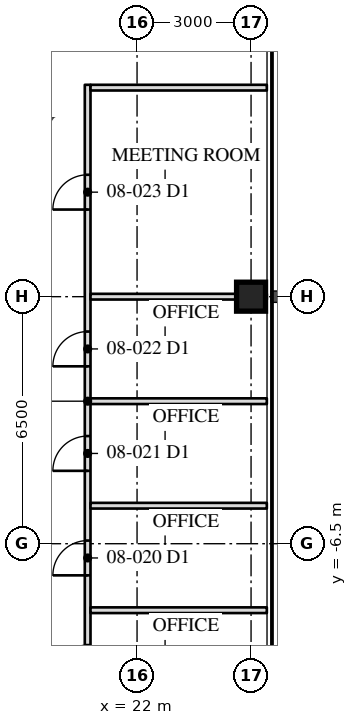
"""IFC4 building model, lengths in metres.
Left out: names, types, materials, properties, quantities, classifications, styles, units other than length and angle.
Written with IfcOpenShell. Run it as: python <this file> out.ifc"""

import sys

from ifc_helpers import new_model, si_unit, direction, frame, frame_2d, origin, origin_2d, place, context, subcontext, project, spatial, rectangle, hollow_rectangle, extrude, element, fill, save


model = new_model("IFC4")
c1 = context("Model", 3, precision=1e-05, world=origin(), true_north=direction((0.0, 1.0)))
c2 = subcontext(c1, "Body", "Model", "MODEL_VIEW")
j1 = project(units=[si_unit("LENGTHUNIT", "METRE"), si_unit("PLANEANGLEUNIT", "RADIAN")], contexts=[c1])
p1 = place(None, origin())
s1 = spatial("IfcSite", under=j1, at=p1, CompositionType="ELEMENT")
p2 = place(p1, origin())
s2 = spatial("IfcBuilding", under=s1, at=p2, CompositionType="ELEMENT")
p3 = place(p2, frame((0.0, 0.0, 36.5)))
s3 = spatial("IfcBuildingStorey", under=s2, at=p3, CompositionType="ELEMENT", Elevation=36.5)
p4 = place(p3, frame((25.0, 0.0, 0.0), z_axis=(0.0, 0.0, 1.0), x_axis=(0.0, 1.0, 0.0)))
e1 = element("IfcColumn", 1, at=p4, inside=s3, PredefinedType="COLUMN", context=c2, shape_type="SweptSolid", body=[
    extrude(hollow_rectangle(XDim=0.762, YDim=0.762, WallThickness=0.127, at=origin_2d()), origin(), (0.0, 0.0, 1.0), 4.1),
])
p5 = place(p3, frame((20.7, -11.075, 0.0), z_axis=(0.0, 0.0, 1.0), x_axis=(0.0, 1.0, 0.0)))
e2 = element("IfcWall", 2, at=p5, inside=s3, PredefinedType="PARTITIONING", context=c2, shape_type="SweptSolid", body=[
    extrude(rectangle(XDim=16.65, YDim=0.15, at=frame_2d((8.325, 0.0))), origin(), (0.0, 0.0, 1.0), 3.91),
])
p6 = place(p5, frame((0.992, 0.0, 0.0)))
e3 = element("IfcOpeningElement", 3, at=p6, cuts=e2, PredefinedType="OPENING", context=c2, shape_type="SweptSolid", body=[
    extrude(rectangle(XDim=0.915, YDim=2.134, at=frame_2d((0.458, 1.067))), frame((0.0, 0.085, 0.0), z_axis=(0.0, -1.0, 0.0), x_axis=(1.0, 0.0, 0.0)), (0.0, 0.0, 1.0), 0.17),
])
p7 = place(p5, frame((3.742, 0.0, 0.0)))
e4 = element("IfcOpeningElement", 4, at=p7, cuts=e2, PredefinedType="OPENING", context=c2, shape_type="SweptSolid", body=[
    extrude(rectangle(XDim=0.915, YDim=2.134, at=frame_2d((0.458, 1.067))), frame((0.0, 0.085, 0.0), z_axis=(0.0, -1.0, 0.0), x_axis=(1.0, 0.0, 0.0)), (0.0, 0.0, 1.0), 0.17),
])
p8 = place(p5, frame((6.492, 0.0, 0.0)))
e5 = element("IfcOpeningElement", 5, at=p8, cuts=e2, PredefinedType="OPENING", context=c2, shape_type="SweptSolid", body=[
    extrude(rectangle(XDim=0.915, YDim=2.134, at=frame_2d((0.458, 1.067))), frame((0.0, 0.085, 0.0), z_axis=(0.0, -1.0, 0.0), x_axis=(1.0, 0.0, 0.0)), (0.0, 0.0, 1.0), 0.17),
])
p9 = place(p5, frame((9.242, 0.0, 0.0)))
e6 = element("IfcOpeningElement", 6, at=p9, cuts=e2, PredefinedType="OPENING", context=c2, shape_type="SweptSolid", body=[
    extrude(rectangle(XDim=0.915, YDim=2.134, at=frame_2d((0.458, 1.067))), frame((0.0, 0.085, 0.0), z_axis=(0.0, -1.0, 0.0), x_axis=(1.0, 0.0, 0.0)), (0.0, 0.0, 1.0), 0.17),
])
p10 = place(p5, frame((13.367, 0.0, 0.0)))
e7 = element("IfcOpeningElement", 7, at=p10, cuts=e2, PredefinedType="OPENING", context=c2, shape_type="SweptSolid", body=[
    extrude(rectangle(XDim=0.915, YDim=2.134, at=frame_2d((0.458, 1.067))), frame((0.0, 0.085, 0.0), z_axis=(0.0, -1.0, 0.0), x_axis=(1.0, 0.0, 0.0)), (0.0, 0.0, 1.0), 0.17),
])
for number, where, z_axis, x_axis in (
    (8, (20.775, -8.25, 0.0), (0.0, 0.0, 1.0), (1.0, 0.0, 0.0)),
    (9, (20.775, -5.5, 0.0), (0.0, 0.0, 1.0), (1.0, 0.0, 0.0)),
    (10, (20.775, -2.75, 0.0), (0.0, 0.0, 1.0), (1.0, 0.0, 0.0)),
):
    element("IfcWall", number, at=place(p3, frame(where, z_axis=z_axis, x_axis=x_axis)), inside=s3, PredefinedType="PARTITIONING", context=c2, shape_type="SweptSolid", body=[
        extrude(rectangle(XDim=4.64, YDim=0.15, at=frame_2d((2.32, 0.0))), origin(), (0.0, 0.0, 1.0), 3.91),
    ])
p11 = place(p3, frame((20.775, 0.0, 0.0), z_axis=(0.0, 0.0, 1.0), x_axis=(1.0, 0.0, 0.0)))
e11 = element("IfcWall", 11, at=p11, inside=s3, PredefinedType="PARTITIONING", context=c2, shape_type="SweptSolid", body=[
    extrude(rectangle(XDim=4.64, YDim=0.15, at=frame_2d((2.32, 0.0))), origin(), (0.0, 0.0, 1.0), 3.13),
])
p12 = place(p3, frame((20.775, 5.5, 0.0), z_axis=(0.0, 0.0, 1.0), x_axis=(1.0, 0.0, 0.0)))
e12 = element("IfcWall", 12, at=p12, inside=s3, PredefinedType="PARTITIONING", context=c2, shape_type="SweptSolid", body=[
    extrude(rectangle(XDim=4.64, YDim=0.15, at=frame_2d((2.32, 0.0))), origin(), (0.0, 0.0, 1.0), 3.91),
])
p13 = place(p6, origin())
e13 = element("IfcDoor", 13, at=p13, inside=s3, OperationType="SINGLE_SWING_LEFT", PredefinedType="DOOR", context=c2, shape_type="SweptSolid", body=[
    extrude(rectangle(XDim=0.915, YDim=2.134, at=frame_2d((0.458, 1.067))), frame((0.0, 0.025, 0.0), z_axis=(0.0, -1.0, 0.0), x_axis=(1.0, 0.0, 0.0)), (0.0, 0.0, 1.0), 0.05),
])
fill(e3, e13)
p14 = place(p7, origin())
e14 = element("IfcDoor", 14, at=p14, inside=s3, OperationType="SINGLE_SWING_LEFT", PredefinedType="DOOR", context=c2, shape_type="SweptSolid", body=[
    extrude(rectangle(XDim=0.915, YDim=2.134, at=frame_2d((0.458, 1.067))), frame((0.0, 0.025, 0.0), z_axis=(0.0, -1.0, 0.0), x_axis=(1.0, 0.0, 0.0)), (0.0, 0.0, 1.0), 0.05),
])
fill(e4, e14)
p15 = place(p8, origin())
e15 = element("IfcDoor", 15, at=p15, inside=s3, OperationType="SINGLE_SWING_LEFT", PredefinedType="DOOR", context=c2, shape_type="SweptSolid", body=[
    extrude(rectangle(XDim=0.915, YDim=2.134, at=frame_2d((0.458, 1.067))), frame((0.0, 0.025, 0.0), z_axis=(0.0, -1.0, 0.0), x_axis=(1.0, 0.0, 0.0)), (0.0, 0.0, 1.0), 0.05),
])
fill(e5, e15)
p16 = place(p9, origin())
e16 = element("IfcDoor", 16, at=p16, inside=s3, OperationType="SINGLE_SWING_LEFT", PredefinedType="DOOR", context=c2, shape_type="SweptSolid", body=[
    extrude(rectangle(XDim=0.915, YDim=2.134, at=frame_2d((0.458, 1.067))), frame((0.0, 0.025, 0.0), z_axis=(0.0, -1.0, 0.0), x_axis=(1.0, 0.0, 0.0)), (0.0, 0.0, 1.0), 0.05),
])
fill(e6, e16)
p17 = place(p10, origin())
e17 = element("IfcDoor", 17, at=p17, inside=s3, OperationType="SINGLE_SWING_LEFT", PredefinedType="DOOR", context=c2, shape_type="SweptSolid", body=[
    extrude(rectangle(XDim=0.915, YDim=2.134, at=frame_2d((0.458, 1.067))), frame((0.0, 0.025, 0.0), z_axis=(0.0, -1.0, 0.0), x_axis=(1.0, 0.0, 0.0)), (0.0, 0.0, 1.0), 0.05),
])
fill(e7, e17)
save(model, sys.argv[1])
